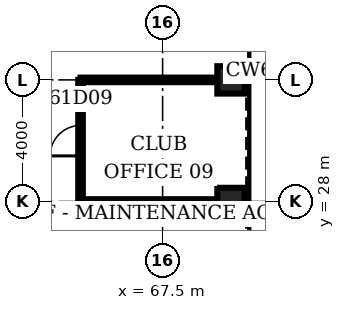
"""IFC4 building model, lengths in metres.
Left out: names, types, materials, properties, quantities, classifications, styles, units other than length and angle.
Written with IfcOpenShell. Run it as: python <this file> out.ifc"""

import sys

from ifc_helpers import new_model, si_unit, direction, frame, frame_2d, origin, origin_2d, place, context, subcontext, project, spatial, rectangle, hollow_rectangle, extrude, element, fill, save


model = new_model("IFC4")
c1 = context("Model", 3, precision=1e-05, world=origin(), true_north=direction((0.0, 1.0)))
c2 = subcontext(c1, "Body", "Model", "MODEL_VIEW")
j1 = project(units=[si_unit("LENGTHUNIT", "METRE"), si_unit("PLANEANGLEUNIT", "RADIAN")], contexts=[c1])
p1 = place(None, origin())
s1 = spatial("IfcSite", under=j1, at=p1, CompositionType="ELEMENT")
p2 = place(p1, origin())
s2 = spatial("IfcBuilding", under=s1, at=p2, CompositionType="ELEMENT")
p3 = place(p2, frame((0.0, 0.0, 271.1)))
s3 = spatial("IfcBuildingStorey", under=s2, at=p3, CompositionType="ELEMENT", Elevation=271.1)
for number, where, z_axis, x_axis in (
    (1, (69.75, 28.0, 0.0), (0.0, 0.0, 1.0), (1.0, 0.0, 0.0)),
    (2, (69.75, 32.0, 0.0), (0.0, 0.0, 1.0), (1.0, 0.0, 0.0)),
):
    element("IfcColumn", number, at=place(p3, frame(where, z_axis=z_axis, x_axis=x_axis)), inside=s3, PredefinedType="COLUMN", context=c2, shape_type="SweptSolid", body=[
        extrude(hollow_rectangle(XDim=0.9, YDim=0.9, WallThickness=0.07, at=origin_2d()), origin(), (0.0, 0.0, 1.0), 4.2),
    ])
for number, where, z_axis, x_axis in (
    (3, (64.8, 28.0, 0.0), (0.0, 0.0, 1.0), (1.0, 0.0, 0.0)),
    (4, (64.8, 32.0, 0.0), (0.0, 0.0, 1.0), (1.0, 0.0, 0.0)),
):
    element("IfcWall", number, at=place(p3, frame(where, z_axis=z_axis, x_axis=x_axis)), inside=s3, PredefinedType="PARTITIONING", context=c2, shape_type="SweptSolid", body=[
        extrude(rectangle(XDim=4.5, YDim=0.15, at=frame_2d((2.25, 0.0))), origin(), (0.0, 0.0, 1.0), 3.0),
    ])
p4 = place(p3, frame((64.8, 28.0, 0.0), z_axis=(0.0, 0.0, 1.0), x_axis=(0.0, 1.0, 0.0)))
e5 = element("IfcWall", 5, at=p4, inside=s3, PredefinedType="PARTITIONING", context=c2, shape_type="SweptSolid", body=[
    extrude(rectangle(XDim=4.0, YDim=0.15, at=frame_2d((2.0, 0.0))), origin(), (0.0, 0.0, 1.0), 3.0),
])
p5 = place(p4, frame((1.5, 0.0, 0.0)))
e6 = element("IfcOpeningElement", 6, at=p5, cuts=e5, PredefinedType="OPENING", context=c2, shape_type="SweptSolid", body=[
    extrude(rectangle(XDim=1.0, YDim=2.1, at=frame_2d((0.5, 1.05))), frame((0.0, 0.085, 0.0), z_axis=(0.0, -1.0, 0.0), x_axis=(1.0, 0.0, 0.0)), (0.0, 0.0, 1.0), 0.17),
])
p6 = place(p5, origin())
e7 = element("IfcDoor", 7, at=p6, inside=s3, OperationType="SINGLE_SWING_LEFT", PredefinedType="DOOR", context=c2, shape_type="SweptSolid", body=[
    extrude(rectangle(XDim=1.0, YDim=2.1, at=frame_2d((0.5, 1.05))), frame((0.0, 0.025, 0.0), z_axis=(0.0, -1.0, 0.0), x_axis=(1.0, 0.0, 0.0)), (0.0, 0.0, 1.0), 0.05),
])
fill(e6, e7)
save(model, sys.argv[1])
